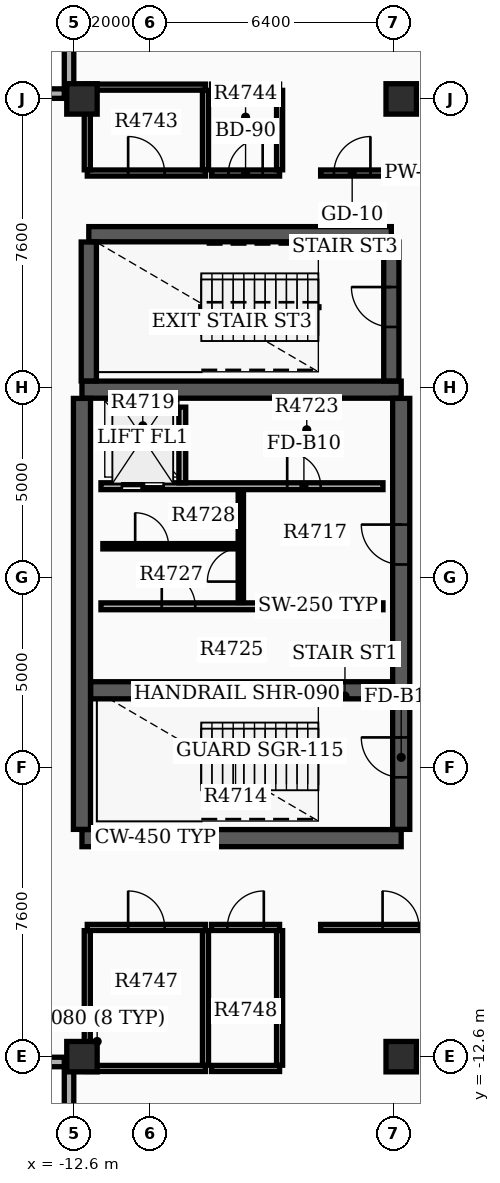
"""IFC4 building model, lengths in metres.
Left out: names, types, materials, properties, quantities, classifications, styles, units other than length and angle.
Written with IfcOpenShell. Run it as: python <this file> out.ifc"""

import sys

from ifc_helpers import new_model, si_unit, direction, frame, frame_2d, origin, origin_2d, place, context, subcontext, project, spatial, rectangle, extrude, element, fill, save


model = new_model("IFC4")
c1 = context("Model", 3, precision=1e-05, world=origin(), true_north=direction((0.0, 1.0)))
c2 = subcontext(c1, "Body", "Model", "MODEL_VIEW")
j1 = project(units=[si_unit("LENGTHUNIT", "METRE"), si_unit("PLANEANGLEUNIT", "RADIAN")], contexts=[c1])
p1 = place(None, origin())
s1 = spatial("IfcSite", under=j1, at=p1, CompositionType="ELEMENT")
p2 = place(p1, origin())
s2 = spatial("IfcBuilding", under=s1, at=p2, CompositionType="ELEMENT")
p3 = place(p2, frame((0.0, 0.0, 308.4)))
s3 = spatial("IfcBuildingStorey", under=s2, at=p3, CompositionType="ELEMENT", Elevation=308.4)
for number, where, z_axis, x_axis in (
    (1, (-12.4, -6.85, 0.0), (0.0, 0.0, 1.0), (1.0, 0.0, 0.0)),
    (2, (-12.4, 4.95, 0.0), (0.0, 0.0, 1.0), (1.0, 0.0, 0.0)),
):
    element("IfcWall", number, at=place(p3, frame(where, z_axis=z_axis, x_axis=x_axis)), inside=s3, PredefinedType="SHEAR", context=c2, shape_type="SweptSolid", body=[
        extrude(rectangle(XDim=8.4, YDim=0.45, at=frame_2d((4.2, 0.0))), origin(), (0.0, 0.0, 1.0), 4.25),
    ])
p4 = place(p3, frame((-12.4, -6.62, 0.0), z_axis=(0.0, 0.0, 1.0), x_axis=(0.0, 1.0, 0.0)))
e3 = element("IfcWall", 3, at=p4, inside=s3, PredefinedType="SHEAR", context=c2, shape_type="SweptSolid", body=[
    extrude(rectangle(XDim=11.34, YDim=0.45, at=frame_2d((5.67, 0.0))), origin(), (0.0, 0.0, 1.0), 4.25),
])
p5 = place(p3, frame((-4.0, -6.62, 0.0), z_axis=(0.0, 0.0, 1.0), x_axis=(0.0, 1.0, 0.0)))
e4 = element("IfcWall", 4, at=p5, inside=s3, PredefinedType="SHEAR", context=c2, shape_type="SweptSolid", body=[
    extrude(rectangle(XDim=11.34, YDim=0.45, at=frame_2d((5.67, 0.0))), origin(), (0.0, 0.0, 1.0), 4.25),
])
p6 = place(p5, frame((1.37, 0.0, 0.0)))
e5 = element("IfcOpeningElement", 5, at=p6, cuts=e4, PredefinedType="OPENING", context=c2, shape_type="SweptSolid", body=[
    extrude(rectangle(XDim=1.05, YDim=2.15, at=frame_2d((0.525, 1.075))), frame((0.0, 0.235, 0.0), z_axis=(0.0, -1.0, 0.0), x_axis=(1.0, 0.0, 0.0)), (0.0, 0.0, 1.0), 0.47),
])
p7 = place(p5, frame((6.97, 0.0, 0.0)))
e6 = element("IfcOpeningElement", 6, at=p7, cuts=e4, PredefinedType="OPENING", context=c2, shape_type="SweptSolid", body=[
    extrude(rectangle(XDim=1.05, YDim=2.15, at=frame_2d((0.525, 1.075))), frame((0.0, 0.235, 0.0), z_axis=(0.0, -1.0, 0.0), x_axis=(1.0, 0.0, 0.0)), (0.0, 0.0, 1.0), 0.47),
])
p8 = place(p3, frame((-12.17, -2.96, 0.0), z_axis=(0.0, 0.0, 1.0), x_axis=(1.0, 0.0, 0.0)))
e7 = element("IfcWall", 7, at=p8, inside=s3, PredefinedType="SHEAR", context=c2, shape_type="SweptSolid", body=[
    extrude(rectangle(XDim=7.94, YDim=0.45, at=frame_2d((3.97, 0.0))), origin(), (0.0, 0.0, 1.0), 4.25),
])
p9 = place(p3, frame((-12.22, 9.04, 0.0), z_axis=(0.0, 0.0, 1.0), x_axis=(1.0, 0.0, 0.0)))
e8 = element("IfcWall", 8, at=p9, inside=s3, PredefinedType="SHEAR", context=c2, shape_type="SweptSolid", body=[
    extrude(rectangle(XDim=7.96, YDim=0.4, at=frame_2d((3.98, 0.0))), origin(), (0.0, 0.0, 1.0), 4.25),
])
p10 = place(p3, frame((-12.22, 5.18, 0.0), z_axis=(0.0, 0.0, 1.0), x_axis=(0.0, 1.0, 0.0)))
e9 = element("IfcWall", 9, at=p10, inside=s3, PredefinedType="SHEAR", context=c2, shape_type="SweptSolid", body=[
    extrude(rectangle(XDim=3.655, YDim=0.4, at=frame_2d((1.828, 0.0))), origin(), (0.0, 0.0, 1.0), 4.25),
])
p11 = place(p3, frame((-4.26, 5.18, 0.0), z_axis=(0.0, 0.0, 1.0), x_axis=(0.0, 1.0, 0.0)))
e10 = element("IfcWall", 10, at=p11, inside=s3, PredefinedType="SHEAR", context=c2, shape_type="SweptSolid", body=[
    extrude(rectangle(XDim=3.655, YDim=0.4, at=frame_2d((1.828, 0.0))), origin(), (0.0, 0.0, 1.0), 4.25),
])
p12 = place(p11, frame((1.42, 0.0, 0.0)))
e11 = element("IfcOpeningElement", 11, at=p12, cuts=e10, PredefinedType="OPENING", context=c2, shape_type="SweptSolid", body=[
    extrude(rectangle(XDim=1.05, YDim=2.15, at=frame_2d((0.525, 1.075))), frame((0.0, 0.21, 0.0), z_axis=(0.0, -1.0, 0.0), x_axis=(1.0, 0.0, 0.0)), (0.0, 0.0, 1.0), 0.42),
])
for number, where, z_axis, x_axis in (
    (12, (-12.4, -12.6, 0.0), (0.0, 0.0, 1.0), (1.0, 0.0, 0.0)),
    (13, (-12.4, 12.6, 0.0), (0.0, 0.0, 1.0), (1.0, 0.0, 0.0)),
    (14, (-4.0, -12.6, 0.0), (0.0, 0.0, 1.0), (1.0, 0.0, 0.0)),
    (15, (-4.0, 12.6, 0.0), (0.0, 0.0, 1.0), (1.0, 0.0, 0.0)),
):
    element("IfcColumn", number, at=place(p3, frame(where, z_axis=z_axis, x_axis=x_axis)), inside=s3, PredefinedType="COLUMN", context=c2, shape_type="SweptSolid", body=[
        extrude(rectangle(XDim=0.8, YDim=0.8, at=origin_2d()), origin(), (0.0, 0.0, 1.0), 4.5),
    ])
p13 = place(p3, frame((-14.115, 12.74, 0.0), z_axis=(0.0, 0.0, 1.0), x_axis=(1.0, 0.0, 0.0)))
e16 = element("IfcWall", 16, at=p13, inside=s3, PredefinedType="STANDARD", context=c2, shape_type="SweptSolid", body=[
    extrude(rectangle(XDim=1.25, YDim=0.25, at=frame_2d((0.625, 0.0))), origin(), (0.0, 0.0, 1.0), 3.73),
])
p14 = place(p3, frame((-12.74, 12.865, 0.0), z_axis=(0.0, 0.0, 1.0), x_axis=(0.0, 1.0, 0.0)))
e17 = element("IfcWall", 17, at=p14, inside=s3, PredefinedType="STANDARD", context=c2, shape_type="SweptSolid", body=[
    extrude(rectangle(XDim=1.5, YDim=0.25, at=frame_2d((0.75, 0.0))), origin(), (0.0, 0.0, 1.0), 3.73),
])
p15 = place(p3, frame((-14.115, -12.74, 0.0), z_axis=(0.0, 0.0, 1.0), x_axis=(1.0, 0.0, 0.0)))
e18 = element("IfcWall", 18, at=p15, inside=s3, PredefinedType="STANDARD", context=c2, shape_type="SweptSolid", body=[
    extrude(rectangle(XDim=1.25, YDim=0.25, at=frame_2d((0.625, 0.0))), origin(), (0.0, 0.0, 1.0), 3.73),
])
p16 = place(p3, frame((-12.74, -12.865, 0.0), z_axis=(0.0, 0.0, 1.0), x_axis=(0.0, -1.0, 0.0)))
e19 = element("IfcWall", 19, at=p16, inside=s3, PredefinedType="STANDARD", context=c2, shape_type="SweptSolid", body=[
    extrude(rectangle(XDim=1.5, YDim=0.25, at=frame_2d((0.75, 0.0))), origin(), (0.0, 0.0, 1.0), 3.73),
])
p17 = place(p3, frame((-11.9, 2.41, 0.0), z_axis=(0.0, 0.0, 1.0), x_axis=(1.0, 0.0, 0.0)))
e20 = element("IfcWall", 20, at=p17, inside=s3, PredefinedType="SOLIDWALL", context=c2, shape_type="SweptSolid", body=[
    extrude(rectangle(XDim=7.42, YDim=0.18, at=frame_2d((3.71, 0.0))), origin(), (0.0, 0.0, 1.0), 3.72),
])
p18 = place(p17, frame((0.55, 0.0, 0.0)))
e21 = element("IfcOpeningElement", 21, at=p18, cuts=e20, PredefinedType="OPENING", context=c2, shape_type="SweptSolid", body=[
    extrude(rectangle(XDim=1.1, YDim=2.15, at=frame_2d((0.55, 1.075))), frame((0.0, 0.1, 0.0), z_axis=(0.0, -1.0, 0.0), x_axis=(1.0, 0.0, 0.0)), (0.0, 0.0, 1.0), 0.2),
])
p19 = place(p17, frame((4.9, 0.0, 0.0)))
e22 = element("IfcOpeningElement", 22, at=p19, cuts=e20, PredefinedType="OPENING", context=c2, shape_type="SweptSolid", body=[
    extrude(rectangle(XDim=0.88, YDim=2.1, at=frame_2d((0.44, 1.05))), frame((0.0, 0.1, 0.0), z_axis=(0.0, -1.0, 0.0), x_axis=(1.0, 0.0, 0.0)), (0.0, 0.0, 1.0), 0.2),
])
p20 = place(p3, frame((-11.9, -0.75, 0.0), z_axis=(0.0, 0.0, 1.0), x_axis=(1.0, 0.0, 0.0)))
e23 = element("IfcWall", 23, at=p20, inside=s3, PredefinedType="SOLIDWALL", context=c2, shape_type="SweptSolid", body=[
    extrude(rectangle(XDim=7.42, YDim=0.18, at=frame_2d((3.71, 0.0))), origin(), (0.0, 0.0, 1.0), 3.72),
])
p21 = place(p20, frame((1.6, 0.0, 0.0)))
e24 = element("IfcOpeningElement", 24, at=p21, cuts=e23, PredefinedType="OPENING", context=c2, shape_type="SweptSolid", body=[
    extrude(rectangle(XDim=0.88, YDim=2.1, at=frame_2d((0.44, 1.05))), frame((0.0, 0.1, 0.0), z_axis=(0.0, -1.0, 0.0), x_axis=(1.0, 0.0, 0.0)), (0.0, 0.0, 1.0), 0.2),
])
p22 = place(p3, frame((-9.76, 2.5, 0.0), z_axis=(0.0, 0.0, 1.0), x_axis=(0.0, 1.0, 0.0)))
e25 = element("IfcWall", 25, at=p22, inside=s3, PredefinedType="SOLIDWALL", context=c2, shape_type="SweptSolid", body=[
    extrude(rectangle(XDim=1.99, YDim=0.18, at=frame_2d((0.995, 0.0))), origin(), (0.0, 0.0, 1.0), 3.72),
])
p23 = place(p3, frame((-8.22, -0.65, 0.0), z_axis=(0.0, 0.0, 1.0), x_axis=(0.0, 1.0, 0.0)))
e26 = element("IfcWall", 26, at=p23, inside=s3, PredefinedType="SOLIDWALL", context=c2, shape_type="SweptSolid", body=[
    extrude(rectangle(XDim=2.96, YDim=0.14, at=frame_2d((1.48, 0.0))), origin(), (0.0, 0.0, 1.0), 3.72),
])
p24 = place(p23, frame((0.55, 0.0, 0.0)))
e27 = element("IfcOpeningElement", 27, at=p24, cuts=e26, PredefinedType="OPENING", context=c2, shape_type="SweptSolid", body=[
    extrude(rectangle(XDim=0.88, YDim=2.1, at=frame_2d((0.44, 1.05))), frame((0.0, 0.08, 0.0), z_axis=(0.0, -1.0, 0.0), x_axis=(1.0, 0.0, 0.0)), (0.0, 0.0, 1.0), 0.16),
])
p25 = place(p3, frame((-11.85, 0.83, 0.0), z_axis=(0.0, 0.0, 1.0), x_axis=(1.0, 0.0, 0.0)))
e28 = element("IfcWall", 28, at=p25, inside=s3, PredefinedType="PARTITIONING", context=c2, shape_type="SweptSolid", body=[
    extrude(rectangle(XDim=3.552, YDim=0.14, at=frame_2d((1.776, 0.0))), origin(), (0.0, 0.0, 1.0), 3.72),
])
p26 = place(p25, frame((0.85, 0.0, 0.0)))
e29 = element("IfcOpeningElement", 29, at=p26, cuts=e28, PredefinedType="OPENING", context=c2, shape_type="SweptSolid", body=[
    extrude(rectangle(XDim=0.88, YDim=2.1, at=frame_2d((0.44, 1.05))), frame((0.0, 0.08, 0.0), z_axis=(0.0, -1.0, 0.0), x_axis=(1.0, 0.0, 0.0)), (0.0, 0.0, 1.0), 0.16),
])
p27 = place(p3, frame((-6.12, 10.65, 0.0), z_axis=(0.0, 0.0, 1.0), x_axis=(1.0, 0.0, 0.0)))
e30 = element("IfcWall", 30, at=p27, inside=s3, PredefinedType="PARTITIONING", context=c2, shape_type="SweptSolid", body=[
    extrude(rectangle(XDim=4.22, YDim=0.16, at=frame_2d((2.11, 0.0))), origin(), (0.0, 0.0, 1.0), 3.72),
])
p28 = place(p27, frame((0.35, 0.0, 0.0)))
e31 = element("IfcOpeningElement", 31, at=p28, cuts=e30, PredefinedType="OPENING", context=c2, shape_type="SweptSolid", body=[
    extrude(rectangle(XDim=0.96, YDim=2.15, at=frame_2d((0.48, 1.075))), frame((0.0, 0.09, 0.0), z_axis=(0.0, -1.0, 0.0), x_axis=(1.0, 0.0, 0.0)), (0.0, 0.0, 1.0), 0.18),
])
p29 = place(p3, frame((-6.12, -9.2, 0.0), z_axis=(0.0, 0.0, 1.0), x_axis=(1.0, 0.0, 0.0)))
e32 = element("IfcWall", 32, at=p29, inside=s3, PredefinedType="PARTITIONING", context=c2, shape_type="SweptSolid", body=[
    extrude(rectangle(XDim=4.22, YDim=0.16, at=frame_2d((2.11, 0.0))), origin(), (0.0, 0.0, 1.0), 3.72),
])
p30 = place(p29, frame((1.63, 0.0, 0.0)))
e33 = element("IfcOpeningElement", 33, at=p30, cuts=e32, PredefinedType="OPENING", context=c2, shape_type="SweptSolid", body=[
    extrude(rectangle(XDim=0.96, YDim=2.15, at=frame_2d((0.48, 1.075))), frame((0.0, 0.09, 0.0), z_axis=(0.0, -1.0, 0.0), x_axis=(1.0, 0.0, 0.0)), (0.0, 0.0, 1.0), 0.18),
])
p31 = place(p3, frame((-12.26, 10.65, 0.0), z_axis=(0.0, 0.0, 1.0), x_axis=(1.0, 0.0, 0.0)))
e34 = element("IfcWall", 34, at=p31, inside=s3, PredefinedType="PARTITIONING", context=c2, shape_type="SweptSolid", body=[
    extrude(rectangle(XDim=3.11, YDim=0.16, at=frame_2d((1.555, 0.0))), origin(), (0.0, 0.0, 1.0), 3.72),
])
p32 = place(p31, frame((1.075, 0.0, 0.0)))
e35 = element("IfcOpeningElement", 35, at=p32, cuts=e34, PredefinedType="OPENING", context=c2, shape_type="SweptSolid", body=[
    extrude(rectangle(XDim=0.96, YDim=2.15, at=frame_2d((0.48, 1.075))), frame((0.0, 0.09, 0.0), z_axis=(0.0, -1.0, 0.0), x_axis=(1.0, 0.0, 0.0)), (0.0, 0.0, 1.0), 0.18),
])
p33 = place(p3, frame((-12.26, 12.91, 0.0), z_axis=(0.0, 0.0, 1.0), x_axis=(1.0, 0.0, 0.0)))
e36 = element("IfcWall", 36, at=p33, inside=s3, PredefinedType="PARTITIONING", context=c2, shape_type="SweptSolid", body=[
    extrude(rectangle(XDim=3.11, YDim=0.16, at=frame_2d((1.555, 0.0))), origin(), (0.0, 0.0, 1.0), 3.72),
])
for number, where, z_axis, x_axis in (
    (37, (-12.26, 10.735, 0.0), (0.0, 0.0, 1.0), (0.0, 1.0, 0.0)),
    (38, (-9.15, 10.735, 0.0), (0.0, 0.0, 1.0), (0.0, 1.0, 0.0)),
):
    element("IfcWall", number, at=place(p3, frame(where, z_axis=z_axis, x_axis=x_axis)), inside=s3, PredefinedType="PARTITIONING", context=c2, shape_type="SweptSolid", body=[
        extrude(rectangle(XDim=2.09, YDim=0.16, at=frame_2d((1.045, 0.0))), origin(), (0.0, 0.0, 1.0), 3.72),
    ])
p34 = place(p3, frame((-8.99, 10.65, 0.0), z_axis=(0.0, 0.0, 1.0), x_axis=(1.0, 0.0, 0.0)))
e39 = element("IfcWall", 39, at=p34, inside=s3, PredefinedType="PARTITIONING", context=c2, shape_type="SweptSolid", body=[
    extrude(rectangle(XDim=1.79, YDim=0.16, at=frame_2d((0.895, 0.0))), origin(), (0.0, 0.0, 1.0), 3.72),
])
p35 = place(p34, frame((0.445, 0.0, 0.0)))
e40 = element("IfcOpeningElement", 40, at=p35, cuts=e39, PredefinedType="OPENING", context=c2, shape_type="SweptSolid", body=[
    extrude(rectangle(XDim=0.9, YDim=2.15, at=frame_2d((0.45, 1.075))), frame((0.0, 0.09, 0.0), z_axis=(0.0, -1.0, 0.0), x_axis=(1.0, 0.0, 0.0)), (0.0, 0.0, 1.0), 0.18),
])
p36 = place(p3, frame((-8.99, 12.91, 0.0), z_axis=(0.0, 0.0, 1.0), x_axis=(1.0, 0.0, 0.0)))
e41 = element("IfcWall", 41, at=p36, inside=s3, PredefinedType="PARTITIONING", context=c2, shape_type="SweptSolid", body=[
    extrude(rectangle(XDim=1.79, YDim=0.16, at=frame_2d((0.895, 0.0))), origin(), (0.0, 0.0, 1.0), 3.72),
])
p37 = place(p3, frame((-7.2, 10.735, 0.0), z_axis=(0.0, 0.0, 1.0), x_axis=(0.0, 1.0, 0.0)))
e42 = element("IfcWall", 42, at=p37, inside=s3, PredefinedType="PARTITIONING", context=c2, shape_type="SweptSolid", body=[
    extrude(rectangle(XDim=2.09, YDim=0.16, at=frame_2d((1.045, 0.0))), origin(), (0.0, 0.0, 1.0), 3.72),
])
p38 = place(p3, frame((-12.26, -12.91, 0.0), z_axis=(0.0, 0.0, 1.0), x_axis=(1.0, 0.0, 0.0)))
e43 = element("IfcWall", 43, at=p38, inside=s3, PredefinedType="PARTITIONING", context=c2, shape_type="SweptSolid", body=[
    extrude(rectangle(XDim=3.11, YDim=0.16, at=frame_2d((1.555, 0.0))), origin(), (0.0, 0.0, 1.0), 3.72),
])
p39 = place(p3, frame((-12.26, -9.2, 0.0), z_axis=(0.0, 0.0, 1.0), x_axis=(1.0, 0.0, 0.0)))
e44 = element("IfcWall", 44, at=p39, inside=s3, PredefinedType="PARTITIONING", context=c2, shape_type="SweptSolid", body=[
    extrude(rectangle(XDim=3.11, YDim=0.16, at=frame_2d((1.555, 0.0))), origin(), (0.0, 0.0, 1.0), 3.72),
])
p40 = place(p39, frame((1.075, 0.0, 0.0)))
e45 = element("IfcOpeningElement", 45, at=p40, cuts=e44, PredefinedType="OPENING", context=c2, shape_type="SweptSolid", body=[
    extrude(rectangle(XDim=0.96, YDim=2.15, at=frame_2d((0.48, 1.075))), frame((0.0, 0.09, 0.0), z_axis=(0.0, -1.0, 0.0), x_axis=(1.0, 0.0, 0.0)), (0.0, 0.0, 1.0), 0.18),
])
for number, where, z_axis, x_axis in (
    (46, (-12.26, -12.825, 0.0), (0.0, 0.0, 1.0), (0.0, 1.0, 0.0)),
    (47, (-9.15, -12.825, 0.0), (0.0, 0.0, 1.0), (0.0, 1.0, 0.0)),
):
    element("IfcWall", number, at=place(p3, frame(where, z_axis=z_axis, x_axis=x_axis)), inside=s3, PredefinedType="PARTITIONING", context=c2, shape_type="SweptSolid", body=[
        extrude(rectangle(XDim=3.54, YDim=0.16, at=frame_2d((1.77, 0.0))), origin(), (0.0, 0.0, 1.0), 3.72),
    ])
p41 = place(p3, frame((-8.99, -12.91, 0.0), z_axis=(0.0, 0.0, 1.0), x_axis=(1.0, 0.0, 0.0)))
e48 = element("IfcWall", 48, at=p41, inside=s3, PredefinedType="PARTITIONING", context=c2, shape_type="SweptSolid", body=[
    extrude(rectangle(XDim=1.79, YDim=0.16, at=frame_2d((0.895, 0.0))), origin(), (0.0, 0.0, 1.0), 3.72),
])
p42 = place(p3, frame((-8.99, -9.2, 0.0), z_axis=(0.0, 0.0, 1.0), x_axis=(1.0, 0.0, 0.0)))
e49 = element("IfcWall", 49, at=p42, inside=s3, PredefinedType="PARTITIONING", context=c2, shape_type="SweptSolid", body=[
    extrude(rectangle(XDim=1.79, YDim=0.16, at=frame_2d((0.895, 0.0))), origin(), (0.0, 0.0, 1.0), 3.72),
])
p43 = place(p42, frame((0.415, 0.0, 0.0)))
e50 = element("IfcOpeningElement", 50, at=p43, cuts=e49, PredefinedType="OPENING", context=c2, shape_type="SweptSolid", body=[
    extrude(rectangle(XDim=0.96, YDim=2.15, at=frame_2d((0.48, 1.075))), frame((0.0, 0.09, 0.0), z_axis=(0.0, -1.0, 0.0), x_axis=(1.0, 0.0, 0.0)), (0.0, 0.0, 1.0), 0.18),
])
p44 = place(p3, frame((-7.2, -12.825, 0.0), z_axis=(0.0, 0.0, 1.0), x_axis=(0.0, 1.0, 0.0)))
e51 = element("IfcWall", 51, at=p44, inside=s3, PredefinedType="PARTITIONING", context=c2, shape_type="SweptSolid", body=[
    extrude(rectangle(XDim=3.54, YDim=0.16, at=frame_2d((1.77, 0.0))), origin(), (0.0, 0.0, 1.0), 3.72),
])
p45 = place(p6, origin())
e52 = element("IfcDoor", 52, at=p45, inside=s3, OperationType="SINGLE_SWING_RIGHT", PredefinedType="DOOR", context=c2, shape_type="SweptSolid", body=[
    extrude(rectangle(XDim=1.05, YDim=2.15, at=frame_2d((0.525, 1.075))), frame((0.0, 0.025, 0.0), z_axis=(0.0, -1.0, 0.0), x_axis=(1.0, 0.0, 0.0)), (0.0, 0.0, 1.0), 0.05),
])
fill(e5, e52)
p46 = place(p7, origin())
e53 = element("IfcDoor", 53, at=p46, inside=s3, OperationType="SINGLE_SWING_RIGHT", PredefinedType="DOOR", context=c2, shape_type="SweptSolid", body=[
    extrude(rectangle(XDim=1.05, YDim=2.15, at=frame_2d((0.525, 1.075))), frame((0.0, 0.025, 0.0), z_axis=(0.0, -1.0, 0.0), x_axis=(1.0, 0.0, 0.0)), (0.0, 0.0, 1.0), 0.05),
])
fill(e6, e53)
p47 = place(p12, origin())
e54 = element("IfcDoor", 54, at=p47, inside=s3, OperationType="SINGLE_SWING_RIGHT", PredefinedType="DOOR", context=c2, shape_type="SweptSolid", body=[
    extrude(rectangle(XDim=1.05, YDim=2.15, at=frame_2d((0.525, 1.075))), frame((0.0, 0.025, 0.0), z_axis=(0.0, -1.0, 0.0), x_axis=(1.0, 0.0, 0.0)), (0.0, 0.0, 1.0), 0.05),
])
fill(e11, e54)
p48 = place(p18, origin())
e55 = element("IfcDoor", 55, at=p48, inside=s3, OperationType="DOUBLE_DOOR_SLIDING", PredefinedType="DOOR", context=c2, shape_type="SweptSolid", body=[
    extrude(rectangle(XDim=1.1, YDim=2.15, at=frame_2d((0.55, 1.075))), frame((0.0, 0.025, 0.0), z_axis=(0.0, -1.0, 0.0), x_axis=(1.0, 0.0, 0.0)), (0.0, 0.0, 1.0), 0.05),
])
fill(e21, e55)
p49 = place(p19, origin())
e56 = element("IfcDoor", 56, at=p49, inside=s3, OperationType="SINGLE_SWING_LEFT", PredefinedType="DOOR", context=c2, shape_type="SweptSolid", body=[
    extrude(rectangle(XDim=0.88, YDim=2.1, at=frame_2d((0.44, 1.05))), frame((0.0, 0.025, 0.0), z_axis=(0.0, -1.0, 0.0), x_axis=(1.0, 0.0, 0.0)), (0.0, 0.0, 1.0), 0.05),
])
fill(e22, e56)
p50 = place(p21, origin())
e57 = element("IfcDoor", 57, at=p50, inside=s3, OperationType="SINGLE_SWING_LEFT", PredefinedType="DOOR", context=c2, shape_type="SweptSolid", body=[
    extrude(rectangle(XDim=0.88, YDim=2.1, at=frame_2d((0.44, 1.05))), frame((0.0, 0.025, 0.0), z_axis=(0.0, -1.0, 0.0), x_axis=(1.0, 0.0, 0.0)), (0.0, 0.0, 1.0), 0.05),
])
fill(e24, e57)
p51 = place(p24, origin())
e58 = element("IfcDoor", 58, at=p51, inside=s3, OperationType="SINGLE_SWING_LEFT", PredefinedType="DOOR", context=c2, shape_type="SweptSolid", body=[
    extrude(rectangle(XDim=0.88, YDim=2.1, at=frame_2d((0.44, 1.05))), frame((0.0, 0.025, 0.0), z_axis=(0.0, -1.0, 0.0), x_axis=(1.0, 0.0, 0.0)), (0.0, 0.0, 1.0), 0.05),
])
fill(e27, e58)
p52 = place(p26, origin())
e59 = element("IfcDoor", 59, at=p52, inside=s3, OperationType="SINGLE_SWING_LEFT", PredefinedType="DOOR", context=c2, shape_type="SweptSolid", body=[
    extrude(rectangle(XDim=0.88, YDim=2.1, at=frame_2d((0.44, 1.05))), frame((0.0, 0.025, 0.0), z_axis=(0.0, -1.0, 0.0), x_axis=(1.0, 0.0, 0.0)), (0.0, 0.0, 1.0), 0.05),
])
fill(e29, e59)
p53 = place(p28, origin())
e60 = element("IfcDoor", 60, at=p53, inside=s3, OperationType="SINGLE_SWING_RIGHT", PredefinedType="DOOR", context=c2, shape_type="SweptSolid", body=[
    extrude(rectangle(XDim=0.96, YDim=2.15, at=frame_2d((0.48, 1.075))), frame((0.0, 0.025, 0.0), z_axis=(0.0, -1.0, 0.0), x_axis=(1.0, 0.0, 0.0)), (0.0, 0.0, 1.0), 0.05),
])
fill(e31, e60)
p54 = place(p30, origin())
e61 = element("IfcDoor", 61, at=p54, inside=s3, OperationType="SINGLE_SWING_LEFT", PredefinedType="DOOR", context=c2, shape_type="SweptSolid", body=[
    extrude(rectangle(XDim=0.96, YDim=2.15, at=frame_2d((0.48, 1.075))), frame((0.0, 0.025, 0.0), z_axis=(0.0, -1.0, 0.0), x_axis=(1.0, 0.0, 0.0)), (0.0, 0.0, 1.0), 0.05),
])
fill(e33, e61)
p55 = place(p32, origin())
e62 = element("IfcDoor", 62, at=p55, inside=s3, OperationType="SINGLE_SWING_LEFT", PredefinedType="DOOR", context=c2, shape_type="SweptSolid", body=[
    extrude(rectangle(XDim=0.96, YDim=2.15, at=frame_2d((0.48, 1.075))), frame((0.0, 0.025, 0.0), z_axis=(0.0, -1.0, 0.0), x_axis=(1.0, 0.0, 0.0)), (0.0, 0.0, 1.0), 0.05),
])
fill(e35, e62)
p56 = place(p35, origin())
e63 = element("IfcDoor", 63, at=p56, inside=s3, OperationType="SINGLE_SWING_RIGHT", PredefinedType="DOOR", context=c2, shape_type="SweptSolid", body=[
    extrude(rectangle(XDim=0.9, YDim=2.15, at=frame_2d((0.45, 1.075))), frame((0.0, 0.025, 0.0), z_axis=(0.0, -1.0, 0.0), x_axis=(1.0, 0.0, 0.0)), (0.0, 0.0, 1.0), 0.05),
])
fill(e40, e63)
p57 = place(p40, origin())
e64 = element("IfcDoor", 64, at=p57, inside=s3, OperationType="SINGLE_SWING_LEFT", PredefinedType="DOOR", context=c2, shape_type="SweptSolid", body=[
    extrude(rectangle(XDim=0.96, YDim=2.15, at=frame_2d((0.48, 1.075))), frame((0.0, 0.025, 0.0), z_axis=(0.0, -1.0, 0.0), x_axis=(1.0, 0.0, 0.0)), (0.0, 0.0, 1.0), 0.05),
])
fill(e45, e64)
p58 = place(p43, origin())
e65 = element("IfcDoor", 65, at=p58, inside=s3, OperationType="SINGLE_SWING_RIGHT", PredefinedType="DOOR", context=c2, shape_type="SweptSolid", body=[
    extrude(rectangle(XDim=0.96, YDim=2.15, at=frame_2d((0.48, 1.075))), frame((0.0, 0.025, 0.0), z_axis=(0.0, -1.0, 0.0), x_axis=(1.0, 0.0, 0.0)), (0.0, 0.0, 1.0), 0.05),
])
fill(e50, e65)
save(model, sys.argv[1])
